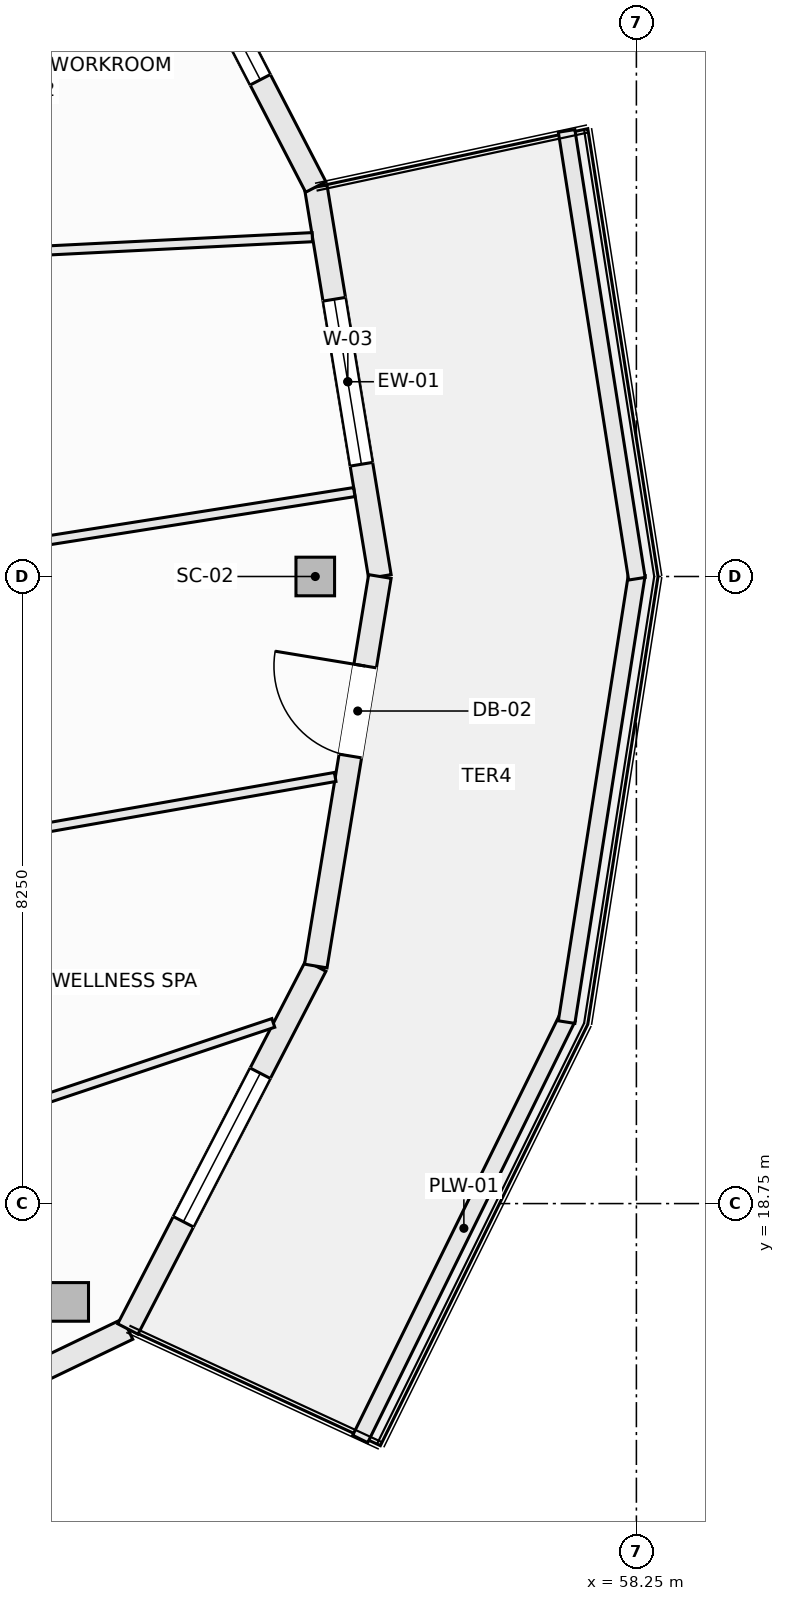
"""IFC4 building model, lengths in metres.
Left out: names, types, materials, properties, quantities, classifications, styles, units other than length and angle.
Written with IfcOpenShell. Run it as: python <this file> out.ifc"""

import sys

from ifc_helpers import new_model, si_unit, direction, frame, frame_2d, origin, origin_2d, place, context, subcontext, project, spatial, rectangle, hollow_rectangle, extrude, element, fill, save


model = new_model("IFC4")
c1 = context("Model", 3, precision=1e-05, world=origin(), true_north=direction((0.0, 1.0)))
c2 = subcontext(c1, "Body", "Model", "MODEL_VIEW")
j1 = project(units=[si_unit("LENGTHUNIT", "METRE"), si_unit("PLANEANGLEUNIT", "RADIAN")], contexts=[c1])
p1 = place(None, origin())
s1 = spatial("IfcSite", under=j1, at=p1, CompositionType="ELEMENT")
p2 = place(p1, origin())
s2 = spatial("IfcBuilding", under=s1, at=p2, CompositionType="ELEMENT")
p3 = place(p2, frame((0.0, 0.0, 222.8)))
s3 = spatial("IfcBuildingStorey", under=s2, at=p3, CompositionType="ELEMENT", Elevation=222.8)
for number, where, z_axis, x_axis in (
    (1, (54.025, 27.0, -0.27), (0.0, 0.0, 1.0), (1.0, 0.0, 0.0)),
    (2, (50.787, 17.456, -0.27), (0.0, 0.0, 1.0), (1.0, 0.0, 0.0)),
):
    element("IfcColumn", number, at=place(p3, frame(where, z_axis=z_axis, x_axis=x_axis)), inside=s3, PredefinedType="COLUMN", context=c2, shape_type="SweptSolid", body=[
        extrude(hollow_rectangle(XDim=0.508, YDim=0.508, WallThickness=0.019, at=origin_2d()), origin(), (0.0, 0.0, 1.0), 3.3),
    ])
p4 = place(p3, frame((54.032, 32.125, 0.0), z_axis=(0.0, 0.0, 1.0), x_axis=(0.16237087798, -0.986729799886, 0.0)))
e3 = element("IfcWall", 3, at=p4, inside=s3, PredefinedType="SOLIDWALL", context=c2, shape_type="SweptSolid", body=[
    extrude(rectangle(XDim=5.193, YDim=0.3, at=frame_2d((2.597, 0.0))), origin(), (0.0, 0.0, 1.0), 2.605),
])
p5 = place(p4, frame((1.497, 0.0, 0.72)))
e4 = element("IfcOpeningElement", 4, at=p5, cuts=e3, PredefinedType="OPENING", context=c2, shape_type="SweptSolid", body=[
    extrude(rectangle(XDim=2.2, YDim=1.65, at=frame_2d((1.1, 0.825))), frame((0.0, 0.16, 0.0), z_axis=(0.0, -1.0, 0.0), x_axis=(1.0, 0.0, 0.0)), (0.0, 0.0, 1.0), 0.32),
])
p6 = place(p3, frame((51.559, 36.9, 0.0), z_axis=(0.0, 0.0, 1.0), x_axis=(0.459808219482, -0.888018243786, 0.0)))
e5 = element("IfcWall", 5, at=p6, inside=s3, PredefinedType="SOLIDWALL", context=c2, shape_type="SweptSolid", body=[
    extrude(rectangle(XDim=5.378, YDim=0.3, at=frame_2d((2.689, 0.0))), origin(), (0.0, 0.0, 1.0), 2.605),
])
p7 = place(p6, frame((1.589, 0.0, 0.72)))
e6 = element("IfcOpeningElement", 6, at=p7, cuts=e5, PredefinedType="OPENING", context=c2, shape_type="SweptSolid", body=[
    extrude(rectangle(XDim=2.2, YDim=1.65, at=frame_2d((1.1, 0.825))), frame((0.0, 0.16, 0.0), z_axis=(0.0, -1.0, 0.0), x_axis=(1.0, 0.0, 0.0)), (0.0, 0.0, 1.0), 0.32),
])
p8 = place(p3, frame((46.133, 14.493, 0.0), z_axis=(0.0, 0.0, 1.0), x_axis=(0.901348331142, 0.433094892545, 0.0)))
e7 = element("IfcWall", 7, at=p8, inside=s3, PredefinedType="SOLIDWALL", context=c2, shape_type="SweptSolid", body=[
    extrude(rectangle(XDim=6.021, YDim=0.3, at=frame_2d((3.01, 0.0))), origin(), (0.0, 0.0, 1.0), 2.605),
])
p9 = place(p8, frame((2.45, 0.0, 0.72)))
e8 = element("IfcOpeningElement", 8, at=p9, cuts=e7, PredefinedType="OPENING", context=c2, shape_type="SweptSolid", body=[
    extrude(rectangle(XDim=2.2, YDim=1.65, at=frame_2d((1.1, 0.825))), frame((0.0, 0.16, 0.0), z_axis=(0.0, -1.0, 0.0), x_axis=(1.0, 0.0, 0.0)), (0.0, 0.0, 1.0), 0.32),
])
p10 = place(p3, frame((51.559, 17.1, 0.0), z_axis=(0.0, 0.0, 1.0), x_axis=(0.459808219482, 0.888018243786, 0.0)))
e9 = element("IfcWall", 9, at=p10, inside=s3, PredefinedType="SOLIDWALL", context=c2, shape_type="SweptSolid", body=[
    extrude(rectangle(XDim=5.378, YDim=0.3, at=frame_2d((2.689, 0.0))), origin(), (0.0, 0.0, 1.0), 2.605),
])
p11 = place(p10, frame((1.589, 0.0, 0.72)))
e10 = element("IfcOpeningElement", 10, at=p11, cuts=e9, PredefinedType="OPENING", context=c2, shape_type="SweptSolid", body=[
    extrude(rectangle(XDim=2.2, YDim=1.65, at=frame_2d((1.1, 0.825))), frame((0.0, 0.16, 0.0), z_axis=(0.0, -1.0, 0.0), x_axis=(1.0, 0.0, 0.0)), (0.0, 0.0, 1.0), 0.32),
])
p12 = place(p3, frame((54.032, 21.875, 0.0), z_axis=(0.0, 0.0, 1.0), x_axis=(0.16237087798, 0.986729799886, 0.0)))
e11 = element("IfcWall", 11, at=p12, inside=s3, PredefinedType="SOLIDWALL", context=c2, shape_type="SweptSolid", body=[
    extrude(rectangle(XDim=5.193, YDim=0.3, at=frame_2d((2.597, 0.0))), origin(), (0.0, 0.0, 1.0), 2.605),
])
p13 = place(p12, frame((2.8, 0.0, 0.0)))
e12 = element("IfcOpeningElement", 12, at=p13, cuts=e11, PredefinedType="OPENING", context=c2, shape_type="SweptSolid", body=[
    extrude(rectangle(XDim=1.2, YDim=2.2, at=frame_2d((0.6, 1.1))), frame((0.0, 0.16, 0.0), z_axis=(0.0, -1.0, 0.0), x_axis=(1.0, 0.0, 0.0)), (0.0, 0.0, 1.0), 0.32),
])
p14 = place(p3, frame((54.616, 15.653, 0.0), z_axis=(0.0, 0.0, 1.0), x_axis=(0.441640961804, 0.897191875162, 0.0)))
e13 = element("IfcWall", 13, at=p14, inside=s3, PredefinedType="PARAPET", context=c2, shape_type="SweptSolid", body=[
    extrude(rectangle(XDim=6.178, YDim=0.22, at=frame_2d((3.089, 0.0))), origin(), (0.0, 0.0, 1.0), 0.52),
])
for number, where, z_axis, x_axis in (
    (14, (57.332, 21.138, 0.0), (0.0, 0.0, 1.0), (0.155, 0.988, 0.0)),
    (15, (57.332, 32.862, 0.0), (0.0, 0.0, 1.0), (0.155, -0.988, 0.0)),
):
    element("IfcWall", number, at=place(p3, frame(where, z_axis=z_axis, x_axis=x_axis)), inside=s3, PredefinedType="PARAPET", context=c2, shape_type="SweptSolid", body=[
        extrude(rectangle(XDim=5.964, YDim=0.22, at=frame_2d((2.982, 0.0))), origin(), (0.0, 0.0, 1.0), 0.52),
    ])
p15 = place(p3, frame((41.582, 26.066, 0.0), z_axis=(0.0, 0.0, 1.0), x_axis=(0.987780616659, 0.155850740621, 0.0)))
e16 = element("IfcWall", 16, at=p15, inside=s3, PredefinedType="PARTITIONING", context=c2, shape_type="SweptSolid", body=[
    extrude(rectangle(XDim=13.116, YDim=0.12, at=frame_2d((6.558, 0.0))), origin(), (0.0, 0.0, 1.0), 2.478),
])
p16 = place(p3, frame((48.191, 19.364, 0.0), z_axis=(0.0, 0.0, 1.0), x_axis=(0.948573630056, 0.316556580033, 0.0)))
e17 = element("IfcWall", 17, at=p16, inside=s3, PredefinedType="PARTITIONING", context=c2, shape_type="SweptSolid", body=[
    extrude(rectangle(XDim=5.568, YDim=0.12, at=frame_2d((2.784, 0.0))), origin(), (0.0, 0.0, 1.0), 3.03),
])
p17 = place(p3, frame((44.412, 22.629, 0.0), z_axis=(0.0, 0.0, 1.0), x_axis=(0.984937605234, 0.172910132136, 0.0)))
e18 = element("IfcWall", 18, at=p17, inside=s3, PredefinedType="PARTITIONING", context=c2, shape_type="SweptSolid", body=[
    extrude(rectangle(XDim=10.026, YDim=0.12, at=frame_2d((5.013, 0.0))), origin(), (0.0, 0.0, 1.0), 2.77),
])
p18 = place(p3, frame((43.901, 30.957, 0.0), z_axis=(0.0, 0.0, 1.0), x_axis=(0.998738311517, 0.050217378547, 0.0)))
e19 = element("IfcWall", 19, at=p18, inside=s3, PredefinedType="PARTITIONING", context=c2, shape_type="SweptSolid", body=[
    extrude(rectangle(XDim=10.098, YDim=0.12, at=frame_2d((5.049, 0.0))), origin(), (0.0, 0.0, 1.0), 3.03),
])
p19 = place(p5, origin())
e20 = element("IfcWindow", 20, at=p19, inside=s3, PartitioningType="SINGLE_PANEL", PredefinedType="WINDOW", context=c2, shape_type="SweptSolid", body=[
    extrude(rectangle(XDim=2.2, YDim=1.65, at=frame_2d((1.1, 0.825))), frame((0.0, 0.03, 0.0), z_axis=(0.0, -1.0, 0.0), x_axis=(1.0, 0.0, 0.0)), (0.0, 0.0, 1.0), 0.06),
])
fill(e4, e20)
p20 = place(p7, origin())
e21 = element("IfcWindow", 21, at=p20, inside=s3, PartitioningType="SINGLE_PANEL", PredefinedType="WINDOW", context=c2, shape_type="SweptSolid", body=[
    extrude(rectangle(XDim=2.2, YDim=1.65, at=frame_2d((1.1, 0.825))), frame((0.0, 0.03, 0.0), z_axis=(0.0, -1.0, 0.0), x_axis=(1.0, 0.0, 0.0)), (0.0, 0.0, 1.0), 0.06),
])
fill(e6, e21)
p21 = place(p11, origin())
e22 = element("IfcWindow", 22, at=p21, inside=s3, PartitioningType="SINGLE_PANEL", PredefinedType="WINDOW", context=c2, shape_type="SweptSolid", body=[
    extrude(rectangle(XDim=2.2, YDim=1.65, at=frame_2d((1.1, 0.825))), frame((0.0, 0.03, 0.0), z_axis=(0.0, -1.0, 0.0), x_axis=(1.0, 0.0, 0.0)), (0.0, 0.0, 1.0), 0.06),
])
fill(e10, e22)
p22 = place(p13, frame((1.2, 0.0, 0.0), z_axis=(0.0, 0.0, 1.0), x_axis=(-1.0, 0.0, 0.0)))
e23 = element("IfcDoor", 23, at=p22, inside=s3, OperationType="SINGLE_SWING_RIGHT", PredefinedType="DOOR", context=c2, shape_type="SweptSolid", body=[
    extrude(rectangle(XDim=1.2, YDim=2.2, at=frame_2d((0.6, 1.1))), frame((0.0, 0.025, 0.0), z_axis=(0.0, -1.0, 0.0), x_axis=(1.0, 0.0, 0.0)), (0.0, 0.0, 1.0), 0.05),
])
fill(e12, e23)
save(model, sys.argv[1])
